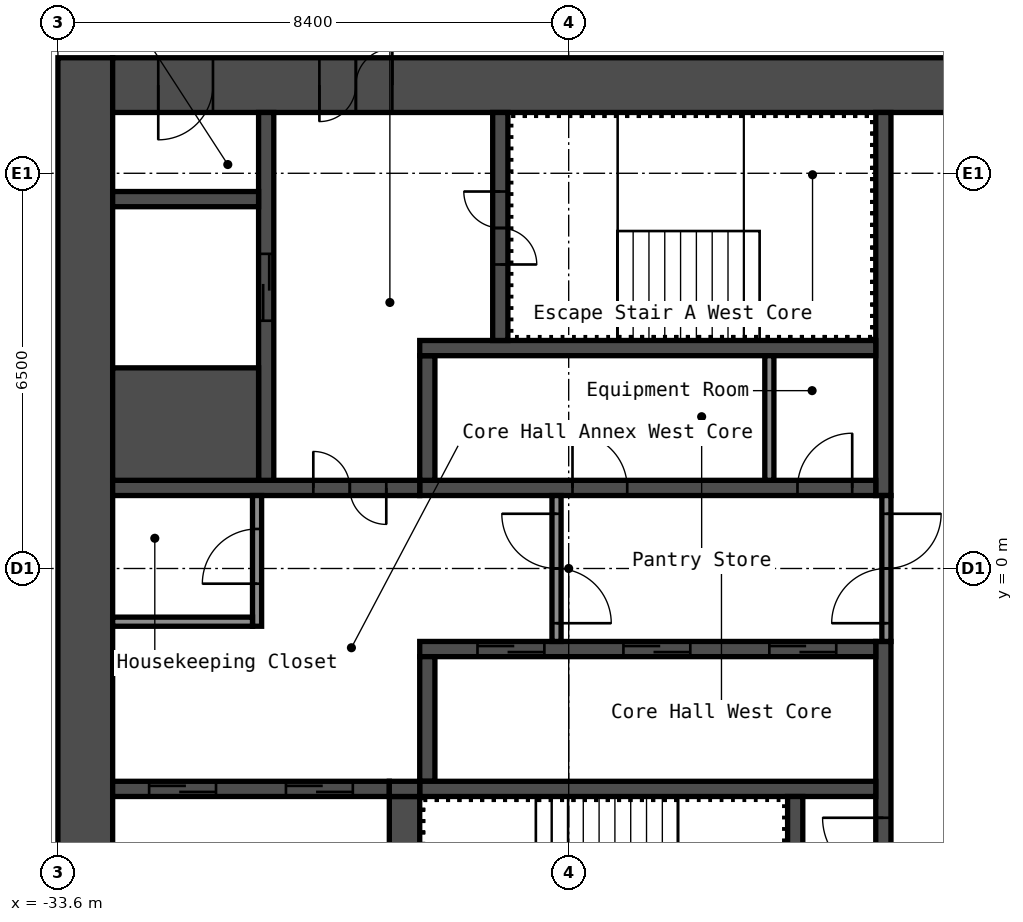
"""IFC4 building model, lengths in metres.
Left out: names, types, materials, properties, quantities, classifications, styles, units other than length and angle.
Written with IfcOpenShell. Run it as: python <this file> out.ifc"""

import sys

from ifc_helpers import new_model, si_unit, direction, frame, frame_2d, origin, place, context, subcontext, project, spatial, rectangle, extrude, element, fill, save


model = new_model("IFC4")
c1 = context("Model", 3, precision=1e-05, world=origin(), true_north=direction((0.0, 1.0)))
c2 = subcontext(c1, "Body", "Model", "MODEL_VIEW")
j1 = project(units=[si_unit("LENGTHUNIT", "METRE"), si_unit("PLANEANGLEUNIT", "RADIAN")], contexts=[c1])
p1 = place(None, origin())
s1 = spatial("IfcSite", under=j1, at=p1, CompositionType="ELEMENT")
p2 = place(p1, origin())
s2 = spatial("IfcBuilding", under=s1, at=p2, CompositionType="ELEMENT")
p3 = place(p2, frame((0.0, 0.0, 180.2)))
s3 = spatial("IfcBuildingStorey", under=s2, at=p3, CompositionType="ELEMENT", Elevation=180.2)
p4 = place(p3, frame((-33.15, -8.4, 0.0), z_axis=(0.0, 0.0, 1.0), x_axis=(0.0, 1.0, 0.0)))
e1 = element("IfcWall", 1, at=p4, inside=s3, PredefinedType="SHEAR", context=c2, shape_type="SweptSolid", body=[
    extrude(rectangle(XDim=16.8, YDim=0.9, at=frame_2d((8.4, 0.0))), origin(), (0.0, 0.0, 1.0), 5.95),
])
p5 = place(p3, frame((-32.7, 7.95, 0.0), z_axis=(0.0, 0.0, 1.0), x_axis=(1.0, 0.0, 0.0)))
e2 = element("IfcWall", 2, at=p5, inside=s3, PredefinedType="SHEAR", context=c2, shape_type="SweptSolid", body=[
    extrude(rectangle(XDim=15.0, YDim=0.9, at=frame_2d((7.5, 0.0))), origin(), (0.0, 0.0, 1.0), 5.95),
])
p6 = place(p5, frame((3.4, 0.0, 0.0)))
e3 = element("IfcOpeningElement", 3, at=p6, cuts=e2, PredefinedType="OPENING", context=c2, shape_type="SweptSolid", body=[
    extrude(rectangle(XDim=1.2, YDim=2.1, at=frame_2d((0.6, 1.05))), frame((0.0, 0.46, 0.0), z_axis=(0.0, -1.0, 0.0), x_axis=(1.0, 0.0, 0.0)), (0.0, 0.0, 1.0), 0.92),
])
p7 = place(p5, frame((0.75, 0.0, 0.0)))
e4 = element("IfcOpeningElement", 4, at=p7, cuts=e2, PredefinedType="OPENING", context=c2, shape_type="SweptSolid", body=[
    extrude(rectangle(XDim=0.9, YDim=2.1, at=frame_2d((0.45, 1.05))), frame((0.0, 0.46, 0.0), z_axis=(0.0, -1.0, 0.0), x_axis=(1.0, 0.0, 0.0)), (0.0, 0.0, 1.0), 0.92),
])
p8 = place(p3, frame((-20.025, 1.2, 0.0), z_axis=(0.0, 0.0, 1.0), x_axis=(0.0, 1.0, 0.0)))
e5 = element("IfcWall", 5, at=p8, inside=s3, PredefinedType="SHEAR", context=c2, shape_type="SweptSolid", body=[
    extrude(rectangle(XDim=6.3, YDim=0.25, at=frame_2d((3.15, 0.0))), origin(), (0.0, 0.0, 1.0), 5.95),
])
p9 = place(p3, frame((-20.025, -7.5, 0.0), z_axis=(0.0, 0.0, 1.0), x_axis=(0.0, 1.0, 0.0)))
e6 = element("IfcWall", 6, at=p9, inside=s3, PredefinedType="SHEAR", context=c2, shape_type="SweptSolid", body=[
    extrude(rectangle(XDim=6.3, YDim=0.25, at=frame_2d((3.15, 0.0))), origin(), (0.0, 0.0, 1.0), 5.95),
])
p10 = place(p9, frame((2.4, 0.0, 0.0)))
e7 = element("IfcOpeningElement", 7, at=p10, cuts=e6, PredefinedType="OPENING", context=c2, shape_type="SweptSolid", body=[
    extrude(rectangle(XDim=1.0, YDim=2.1, at=frame_2d((0.5, 1.05))), frame((0.0, 0.135, 0.0), z_axis=(0.0, -1.0, 0.0), x_axis=(1.0, 0.0, 0.0)), (0.0, 0.0, 1.0), 0.27),
])
p11 = place(p3, frame((-27.65, 1.325, 0.0), z_axis=(0.0, 0.0, 1.0), x_axis=(1.0, 0.0, 0.0)))
e8 = element("IfcWall", 8, at=p11, inside=s3, PredefinedType="SHEAR", context=c2, shape_type="SweptSolid", body=[
    extrude(rectangle(XDim=7.5, YDim=0.25, at=frame_2d((3.75, 0.0))), origin(), (0.0, 0.0, 1.0), 5.95),
])
p12 = place(p11, frame((6.212, 0.0, 0.0)))
e9 = element("IfcOpeningElement", 9, at=p12, cuts=e8, PredefinedType="OPENING", context=c2, shape_type="SweptSolid", body=[
    extrude(rectangle(XDim=0.9, YDim=2.1, at=frame_2d((0.45, 1.05))), frame((0.0, 0.135, 0.0), z_axis=(0.0, -1.0, 0.0), x_axis=(1.0, 0.0, 0.0)), (0.0, 0.0, 1.0), 0.27),
])
p13 = place(p11, frame((2.512, 0.0, 0.0)))
e10 = element("IfcOpeningElement", 10, at=p13, cuts=e8, PredefinedType="OPENING", context=c2, shape_type="SweptSolid", body=[
    extrude(rectangle(XDim=0.9, YDim=2.1, at=frame_2d((0.45, 1.05))), frame((0.0, 0.135, 0.0), z_axis=(0.0, -1.0, 0.0), x_axis=(1.0, 0.0, 0.0)), (0.0, 0.0, 1.0), 0.27),
])
p14 = place(p3, frame((-27.525, 1.45, 0.0), z_axis=(0.0, 0.0, 1.0), x_axis=(0.0, 1.0, 0.0)))
e11 = element("IfcWall", 11, at=p14, inside=s3, PredefinedType="SHEAR", context=c2, shape_type="SweptSolid", body=[
    extrude(rectangle(XDim=2.05, YDim=0.25, at=frame_2d((1.025, 0.0))), origin(), (0.0, 0.0, 1.0), 5.95),
])
p15 = place(p3, frame((-27.65, 3.625, 0.0), z_axis=(0.0, 0.0, 1.0), x_axis=(1.0, 0.0, 0.0)))
e12 = element("IfcWall", 12, at=p15, inside=s3, PredefinedType="SHEAR", context=c2, shape_type="SweptSolid", body=[
    extrude(rectangle(XDim=7.5, YDim=0.25, at=frame_2d((3.75, 0.0))), origin(), (0.0, 0.0, 1.0), 5.95),
])
p16 = place(p3, frame((-26.325, 3.75, 0.0), z_axis=(0.0, 0.0, 1.0), x_axis=(0.0, 1.0, 0.0)))
e13 = element("IfcWall", 13, at=p16, inside=s3, PredefinedType="SHEAR", context=c2, shape_type="SweptSolid", body=[
    extrude(rectangle(XDim=3.75, YDim=0.25, at=frame_2d((1.875, 0.0))), origin(), (0.0, 0.0, 1.0), 5.95),
])
p17 = place(p16, frame((1.25, 0.0, 0.0)))
e14 = element("IfcOpeningElement", 14, at=p17, cuts=e13, PredefinedType="OPENING", context=c2, shape_type="SweptSolid", body=[
    extrude(rectangle(XDim=1.2, YDim=2.1, at=frame_2d((0.6, 1.05))), frame((0.0, 0.135, 0.0), z_axis=(0.0, -1.0, 0.0), x_axis=(1.0, 0.0, 0.0)), (0.0, 0.0, 1.0), 0.27),
])
p18 = place(p3, frame((-32.7, 1.325, 0.0), z_axis=(0.0, 0.0, 1.0), x_axis=(1.0, 0.0, 0.0)))
e15 = element("IfcWall", 15, at=p18, inside=s3, PredefinedType="SHEAR", context=c2, shape_type="SweptSolid", body=[
    extrude(rectangle(XDim=5.05, YDim=0.25, at=frame_2d((2.525, 0.0))), origin(), (0.0, 0.0, 1.0), 5.95),
])
p19 = place(p18, frame((3.3, 0.0, 0.0)))
e16 = element("IfcOpeningElement", 16, at=p19, cuts=e15, PredefinedType="OPENING", context=c2, shape_type="SweptSolid", body=[
    extrude(rectangle(XDim=1.2, YDim=2.1, at=frame_2d((0.6, 1.05))), frame((0.0, 0.135, 0.0), z_axis=(0.0, -1.0, 0.0), x_axis=(1.0, 0.0, 0.0)), (0.0, 0.0, 1.0), 0.27),
])
p20 = place(p3, frame((-30.175, 1.45, 0.0), z_axis=(0.0, 0.0, 1.0), x_axis=(0.0, 1.0, 0.0)))
e17 = element("IfcWall", 17, at=p20, inside=s3, PredefinedType="SHEAR", context=c2, shape_type="SweptSolid", body=[
    extrude(rectangle(XDim=6.05, YDim=0.25, at=frame_2d((3.025, 0.0))), origin(), (0.0, 0.0, 1.0), 5.95),
])
p21 = place(p20, frame((2.625, 0.0, 0.0)))
e18 = element("IfcOpeningElement", 18, at=p21, cuts=e17, PredefinedType="OPENING", context=c2, shape_type="SweptSolid", body=[
    extrude(rectangle(XDim=1.1, YDim=2.1, at=frame_2d((0.55, 1.05))), frame((0.0, 0.135, 0.0), z_axis=(0.0, -1.0, 0.0), x_axis=(1.0, 0.0, 0.0)), (0.0, 0.0, 1.0), 0.27),
])
p22 = place(p3, frame((-32.7, 2.375, 0.0), z_axis=(0.0, 0.0, 1.0), x_axis=(1.0, 0.0, 0.0)))
e19 = element("IfcWall", 19, at=p22, inside=s3, PredefinedType="SHEAR", context=c2, shape_type="SweptSolid", body=[
    extrude(rectangle(XDim=2.4, YDim=1.85, at=frame_2d((1.2, 0.0))), origin(), (0.0, 0.0, 1.0), 5.95),
])
p23 = place(p3, frame((-32.7, 6.075, 0.0), z_axis=(0.0, 0.0, 1.0), x_axis=(1.0, 0.0, 0.0)))
e20 = element("IfcWall", 20, at=p23, inside=s3, PredefinedType="SHEAR", context=c2, shape_type="SweptSolid", body=[
    extrude(rectangle(XDim=2.4, YDim=0.25, at=frame_2d((1.2, 0.0))), origin(), (0.0, 0.0, 1.0), 5.95),
])
p24 = place(p3, frame((-27.65, -1.325, 0.0), z_axis=(0.0, 0.0, 1.0), x_axis=(1.0, 0.0, 0.0)))
e21 = element("IfcWall", 21, at=p24, inside=s3, PredefinedType="SHEAR", context=c2, shape_type="SweptSolid", body=[
    extrude(rectangle(XDim=7.5, YDim=0.25, at=frame_2d((3.75, 0.0))), origin(), (0.0, 0.0, 1.0), 5.95),
])
p25 = place(p24, frame((5.75, 0.0, 0.0)))
e22 = element("IfcOpeningElement", 22, at=p25, cuts=e21, PredefinedType="OPENING", context=c2, shape_type="SweptSolid", body=[
    extrude(rectangle(XDim=1.1, YDim=2.1, at=frame_2d((0.55, 1.05))), frame((0.0, 0.135, 0.0), z_axis=(0.0, -1.0, 0.0), x_axis=(1.0, 0.0, 0.0)), (0.0, 0.0, 1.0), 0.27),
])
p26 = place(p24, frame((3.35, 0.0, 0.0)))
e23 = element("IfcOpeningElement", 23, at=p26, cuts=e21, PredefinedType="OPENING", context=c2, shape_type="SweptSolid", body=[
    extrude(rectangle(XDim=1.1, YDim=2.1, at=frame_2d((0.55, 1.05))), frame((0.0, 0.135, 0.0), z_axis=(0.0, -1.0, 0.0), x_axis=(1.0, 0.0, 0.0)), (0.0, 0.0, 1.0), 0.27),
])
p27 = place(p24, frame((0.95, 0.0, 0.0)))
e24 = element("IfcOpeningElement", 24, at=p27, cuts=e21, PredefinedType="OPENING", context=c2, shape_type="SweptSolid", body=[
    extrude(rectangle(XDim=1.1, YDim=2.1, at=frame_2d((0.55, 1.05))), frame((0.0, 0.135, 0.0), z_axis=(0.0, -1.0, 0.0), x_axis=(1.0, 0.0, 0.0)), (0.0, 0.0, 1.0), 0.27),
])
p28 = place(p3, frame((-27.525, -3.5, 0.0), z_axis=(0.0, 0.0, 1.0), x_axis=(0.0, 1.0, 0.0)))
e25 = element("IfcWall", 25, at=p28, inside=s3, PredefinedType="SHEAR", context=c2, shape_type="SweptSolid", body=[
    extrude(rectangle(XDim=2.05, YDim=0.25, at=frame_2d((1.025, 0.0))), origin(), (0.0, 0.0, 1.0), 5.95),
])
p29 = place(p3, frame((-27.65, -3.625, 0.0), z_axis=(0.0, 0.0, 1.0), x_axis=(1.0, 0.0, 0.0)))
e26 = element("IfcWall", 26, at=p29, inside=s3, PredefinedType="SHEAR", context=c2, shape_type="SweptSolid", body=[
    extrude(rectangle(XDim=7.5, YDim=0.25, at=frame_2d((3.75, 0.0))), origin(), (0.0, 0.0, 1.0), 5.95),
])
p30 = place(p3, frame((-21.475, -7.5, 0.0), z_axis=(0.0, 0.0, 1.0), x_axis=(0.0, 1.0, 0.0)))
e27 = element("IfcWall", 27, at=p30, inside=s3, PredefinedType="SHEAR", context=c2, shape_type="SweptSolid", body=[
    extrude(rectangle(XDim=3.75, YDim=0.25, at=frame_2d((1.875, 0.0))), origin(), (0.0, 0.0, 1.0), 5.95),
])
p31 = place(p30, frame((1.3, 0.0, 0.0)))
e28 = element("IfcOpeningElement", 28, at=p31, cuts=e27, PredefinedType="OPENING", context=c2, shape_type="SweptSolid", body=[
    extrude(rectangle(XDim=1.2, YDim=2.1, at=frame_2d((0.6, 1.05))), frame((0.0, 0.135, 0.0), z_axis=(0.0, -1.0, 0.0), x_axis=(1.0, 0.0, 0.0)), (0.0, 0.0, 1.0), 0.27),
])
p32 = place(p3, frame((-27.9, -7.5, 0.0), z_axis=(0.0, 0.0, 1.0), x_axis=(0.0, 1.0, 0.0)))
e29 = element("IfcWall", 29, at=p32, inside=s3, PredefinedType="SHEAR", context=c2, shape_type="SweptSolid", body=[
    extrude(rectangle(XDim=3.75, YDim=0.5, at=frame_2d((1.875, 0.0))), origin(), (0.0, 0.0, 1.0), 5.95),
])
p33 = place(p3, frame((-32.7, -3.625, 0.0), z_axis=(0.0, 0.0, 1.0), x_axis=(1.0, 0.0, 0.0)))
e30 = element("IfcWall", 30, at=p33, inside=s3, PredefinedType="SHEAR", context=c2, shape_type="SweptSolid", body=[
    extrude(rectangle(XDim=4.55, YDim=0.25, at=frame_2d((2.275, 0.0))), origin(), (0.0, 0.0, 1.0), 5.95),
])
p34 = place(p33, frame((2.85, 0.0, 0.0)))
e31 = element("IfcOpeningElement", 31, at=p34, cuts=e30, PredefinedType="OPENING", context=c2, shape_type="SweptSolid", body=[
    extrude(rectangle(XDim=1.1, YDim=2.1, at=frame_2d((0.55, 1.05))), frame((0.0, 0.135, 0.0), z_axis=(0.0, -1.0, 0.0), x_axis=(1.0, 0.0, 0.0)), (0.0, 0.0, 1.0), 0.27),
])
p35 = place(p33, frame((0.6, 0.0, 0.0)))
e32 = element("IfcOpeningElement", 32, at=p35, cuts=e30, PredefinedType="OPENING", context=c2, shape_type="SweptSolid", body=[
    extrude(rectangle(XDim=1.1, YDim=2.1, at=frame_2d((0.55, 1.05))), frame((0.0, 0.135, 0.0), z_axis=(0.0, -1.0, 0.0), x_axis=(1.0, 0.0, 0.0)), (0.0, 0.0, 1.0), 0.27),
])
p36 = place(p3, frame((-28.15, -3.625, 0.0), z_axis=(0.0, 0.0, 1.0), x_axis=(1.0, 0.0, 0.0)))
e33 = element("IfcWall", 33, at=p36, inside=s3, PredefinedType="SHEAR", context=c2, shape_type="SweptSolid", body=[
    extrude(rectangle(XDim=0.5, YDim=0.25, at=frame_2d((0.25, 0.0))), origin(), (0.0, 0.0, 1.0), 5.95),
])
p37 = place(p3, frame((-19.975, -1.2, 0.0), z_axis=(0.0, 0.0, 1.0), x_axis=(0.0, 1.0, 0.0)))
e34 = element("IfcWall", 34, at=p37, inside=s3, PredefinedType="PARTITIONING", context=c2, shape_type="SweptSolid", body=[
    extrude(rectangle(XDim=2.4, YDim=0.15, at=frame_2d((1.2, 0.0))), origin(), (0.0, 0.0, 1.0), 5.95),
])
p38 = place(p37, frame((0.3, 0.0, 0.0)))
e35 = element("IfcOpeningElement", 35, at=p38, cuts=e34, PredefinedType="OPENING", context=c2, shape_type="SweptSolid", body=[
    extrude(rectangle(XDim=1.8, YDim=2.1, at=frame_2d((0.9, 1.05))), frame((0.0, 0.085, 0.0), z_axis=(0.0, -1.0, 0.0), x_axis=(1.0, 0.0, 0.0)), (0.0, 0.0, 1.0), 0.17),
])
p39 = place(p3, frame((-25.4, -1.2, 0.0), z_axis=(0.0, 0.0, 1.0), x_axis=(0.0, 1.0, 0.0)))
e36 = element("IfcWall", 36, at=p39, inside=s3, PredefinedType="PARTITIONING", context=c2, shape_type="SweptSolid", body=[
    extrude(rectangle(XDim=2.4, YDim=0.15, at=frame_2d((1.2, 0.0))), origin(), (0.0, 0.0, 1.0), 5.95),
])
p40 = place(p39, frame((0.3, 0.0, 0.0)))
e37 = element("IfcOpeningElement", 37, at=p40, cuts=e36, PredefinedType="OPENING", context=c2, shape_type="SweptSolid", body=[
    extrude(rectangle(XDim=1.8, YDim=2.1, at=frame_2d((0.9, 1.05))), frame((0.0, 0.085, 0.0), z_axis=(0.0, -1.0, 0.0), x_axis=(1.0, 0.0, 0.0)), (0.0, 0.0, 1.0), 0.17),
])
p41 = place(p3, frame((-30.325, -0.95, 0.0), z_axis=(0.0, 0.0, 1.0), x_axis=(0.0, 1.0, 0.0)))
e38 = element("IfcWall", 38, at=p41, inside=s3, PredefinedType="PARTITIONING", context=c2, shape_type="SweptSolid", body=[
    extrude(rectangle(XDim=2.15, YDim=0.15, at=frame_2d((1.075, 0.0))), origin(), (0.0, 0.0, 1.0), 5.95),
])
p42 = place(p41, frame((0.7, 0.0, 0.0)))
e39 = element("IfcOpeningElement", 39, at=p42, cuts=e38, PredefinedType="OPENING", context=c2, shape_type="SweptSolid", body=[
    extrude(rectangle(XDim=0.9, YDim=2.1, at=frame_2d((0.45, 1.05))), frame((0.0, 0.085, 0.0), z_axis=(0.0, -1.0, 0.0), x_axis=(1.0, 0.0, 0.0)), (0.0, 0.0, 1.0), 0.17),
])
p43 = place(p3, frame((-32.7, -0.875, 0.0), z_axis=(0.0, 0.0, 1.0), x_axis=(1.0, 0.0, 0.0)))
e40 = element("IfcWall", 40, at=p43, inside=s3, PredefinedType="PARTITIONING", context=c2, shape_type="SweptSolid", body=[
    extrude(rectangle(XDim=2.3, YDim=0.15, at=frame_2d((1.15, 0.0))), origin(), (0.0, 0.0, 1.0), 5.95),
])
p44 = place(p3, frame((-21.9, 1.45, 0.0), z_axis=(0.0, 0.0, 1.0), x_axis=(0.0, 1.0, 0.0)))
e41 = element("IfcWall", 41, at=p44, inside=s3, PredefinedType="PARTITIONING", context=c2, shape_type="SweptSolid", body=[
    extrude(rectangle(XDim=2.05, YDim=0.15, at=frame_2d((1.025, 0.0))), origin(), (0.0, 0.0, 1.0), 5.95),
])
p45 = place(p6, origin())
e42 = element("IfcDoor", 42, at=p45, inside=s3, OperationType="DOUBLE_DOOR_SINGLE_SWING", PredefinedType="DOOR", context=c2, shape_type="SweptSolid", body=[
    extrude(rectangle(XDim=1.2, YDim=2.1, at=frame_2d((0.6, 1.05))), frame((0.0, 0.025, 0.0), z_axis=(0.0, -1.0, 0.0), x_axis=(1.0, 0.0, 0.0)), (0.0, 0.0, 1.0), 0.05),
])
fill(e3, e42)
p46 = place(p7, origin())
e43 = element("IfcDoor", 43, at=p46, inside=s3, OperationType="SINGLE_SWING_LEFT", PredefinedType="DOOR", context=c2, shape_type="SweptSolid", body=[
    extrude(rectangle(XDim=0.9, YDim=2.1, at=frame_2d((0.45, 1.05))), frame((0.0, 0.025, 0.0), z_axis=(0.0, -1.0, 0.0), x_axis=(1.0, 0.0, 0.0)), (0.0, 0.0, 1.0), 0.05),
])
fill(e4, e43)
p47 = place(p17, origin())
e44 = element("IfcDoor", 44, at=p47, inside=s3, OperationType="DOUBLE_DOOR_SINGLE_SWING", PredefinedType="DOOR", context=c2, shape_type="SweptSolid", body=[
    extrude(rectangle(XDim=1.2, YDim=2.1, at=frame_2d((0.6, 1.05))), frame((0.0, 0.025, 0.0), z_axis=(0.0, -1.0, 0.0), x_axis=(1.0, 0.0, 0.0)), (0.0, 0.0, 1.0), 0.05),
])
fill(e14, e44)
p48 = place(p10, origin())
e45 = element("IfcDoor", 45, at=p48, inside=s3, OperationType="SINGLE_SWING_LEFT", PredefinedType="DOOR", context=c2, shape_type="SweptSolid", body=[
    extrude(rectangle(XDim=1.0, YDim=2.1, at=frame_2d((0.5, 1.05))), frame((0.0, 0.025, 0.0), z_axis=(0.0, -1.0, 0.0), x_axis=(1.0, 0.0, 0.0)), (0.0, 0.0, 1.0), 0.05),
])
fill(e7, e45)
p49 = place(p19, origin())
e46 = element("IfcDoor", 46, at=p49, inside=s3, OperationType="DOUBLE_DOOR_SINGLE_SWING", PredefinedType="DOOR", context=c2, shape_type="SweptSolid", body=[
    extrude(rectangle(XDim=1.2, YDim=2.1, at=frame_2d((0.6, 1.05))), frame((0.0, 0.025, 0.0), z_axis=(0.0, -1.0, 0.0), x_axis=(1.0, 0.0, 0.0)), (0.0, 0.0, 1.0), 0.05),
])
fill(e16, e46)
p50 = place(p38, origin())
e47 = element("IfcDoor", 47, at=p50, inside=s3, OperationType="DOUBLE_DOOR_SINGLE_SWING", PredefinedType="DOOR", context=c2, shape_type="SweptSolid", body=[
    extrude(rectangle(XDim=1.8, YDim=2.1, at=frame_2d((0.9, 1.05))), frame((0.0, 0.025, 0.0), z_axis=(0.0, -1.0, 0.0), x_axis=(1.0, 0.0, 0.0)), (0.0, 0.0, 1.0), 0.05),
])
fill(e35, e47)
p51 = place(p40, origin())
e48 = element("IfcDoor", 48, at=p51, inside=s3, OperationType="DOUBLE_DOOR_SINGLE_SWING", PredefinedType="DOOR", context=c2, shape_type="SweptSolid", body=[
    extrude(rectangle(XDim=1.8, YDim=2.1, at=frame_2d((0.9, 1.05))), frame((0.0, 0.025, 0.0), z_axis=(0.0, -1.0, 0.0), x_axis=(1.0, 0.0, 0.0)), (0.0, 0.0, 1.0), 0.05),
])
fill(e37, e48)
p52 = place(p42, origin())
e49 = element("IfcDoor", 49, at=p52, inside=s3, OperationType="SINGLE_SWING_RIGHT", PredefinedType="DOOR", context=c2, shape_type="SweptSolid", body=[
    extrude(rectangle(XDim=0.9, YDim=2.1, at=frame_2d((0.45, 1.05))), frame((0.0, 0.025, 0.0), z_axis=(0.0, -1.0, 0.0), x_axis=(1.0, 0.0, 0.0)), (0.0, 0.0, 1.0), 0.05),
])
fill(e39, e49)
p53 = place(p12, origin())
e50 = element("IfcDoor", 50, at=p53, inside=s3, OperationType="SINGLE_SWING_LEFT", PredefinedType="DOOR", context=c2, shape_type="SweptSolid", body=[
    extrude(rectangle(XDim=0.9, YDim=2.1, at=frame_2d((0.45, 1.05))), frame((0.0, 0.025, 0.0), z_axis=(0.0, -1.0, 0.0), x_axis=(1.0, 0.0, 0.0)), (0.0, 0.0, 1.0), 0.05),
])
fill(e9, e50)
p54 = place(p13, origin())
e51 = element("IfcDoor", 51, at=p54, inside=s3, OperationType="SINGLE_SWING_RIGHT", PredefinedType="DOOR", context=c2, shape_type="SweptSolid", body=[
    extrude(rectangle(XDim=0.9, YDim=2.1, at=frame_2d((0.45, 1.05))), frame((0.0, 0.025, 0.0), z_axis=(0.0, -1.0, 0.0), x_axis=(1.0, 0.0, 0.0)), (0.0, 0.0, 1.0), 0.05),
])
fill(e10, e51)
p55 = place(p25, origin())
e52 = element("IfcDoor", 52, at=p55, inside=s3, OperationType="DOUBLE_DOOR_SLIDING", PredefinedType="DOOR", context=c2, shape_type="SweptSolid", body=[
    extrude(rectangle(XDim=1.1, YDim=2.1, at=frame_2d((0.55, 1.05))), frame((0.0, 0.025, 0.0), z_axis=(0.0, -1.0, 0.0), x_axis=(1.0, 0.0, 0.0)), (0.0, 0.0, 1.0), 0.05),
])
fill(e22, e52)
p56 = place(p26, origin())
e53 = element("IfcDoor", 53, at=p56, inside=s3, OperationType="DOUBLE_DOOR_SLIDING", PredefinedType="DOOR", context=c2, shape_type="SweptSolid", body=[
    extrude(rectangle(XDim=1.1, YDim=2.1, at=frame_2d((0.55, 1.05))), frame((0.0, 0.025, 0.0), z_axis=(0.0, -1.0, 0.0), x_axis=(1.0, 0.0, 0.0)), (0.0, 0.0, 1.0), 0.05),
])
fill(e23, e53)
p57 = place(p27, origin())
e54 = element("IfcDoor", 54, at=p57, inside=s3, OperationType="DOUBLE_DOOR_SLIDING", PredefinedType="DOOR", context=c2, shape_type="SweptSolid", body=[
    extrude(rectangle(XDim=1.1, YDim=2.1, at=frame_2d((0.55, 1.05))), frame((0.0, 0.025, 0.0), z_axis=(0.0, -1.0, 0.0), x_axis=(1.0, 0.0, 0.0)), (0.0, 0.0, 1.0), 0.05),
])
fill(e24, e54)
p58 = place(p21, origin())
e55 = element("IfcDoor", 55, at=p58, inside=s3, OperationType="DOUBLE_DOOR_SLIDING", PredefinedType="DOOR", context=c2, shape_type="SweptSolid", body=[
    extrude(rectangle(XDim=1.1, YDim=2.1, at=frame_2d((0.55, 1.05))), frame((0.0, 0.025, 0.0), z_axis=(0.0, -1.0, 0.0), x_axis=(1.0, 0.0, 0.0)), (0.0, 0.0, 1.0), 0.05),
])
fill(e18, e55)
p59 = place(p34, origin())
e56 = element("IfcDoor", 56, at=p59, inside=s3, OperationType="DOUBLE_DOOR_SLIDING", PredefinedType="DOOR", context=c2, shape_type="SweptSolid", body=[
    extrude(rectangle(XDim=1.1, YDim=2.1, at=frame_2d((0.55, 1.05))), frame((0.0, 0.025, 0.0), z_axis=(0.0, -1.0, 0.0), x_axis=(1.0, 0.0, 0.0)), (0.0, 0.0, 1.0), 0.05),
])
fill(e31, e56)
p60 = place(p35, origin())
e57 = element("IfcDoor", 57, at=p60, inside=s3, OperationType="DOUBLE_DOOR_SLIDING", PredefinedType="DOOR", context=c2, shape_type="SweptSolid", body=[
    extrude(rectangle(XDim=1.1, YDim=2.1, at=frame_2d((0.55, 1.05))), frame((0.0, 0.025, 0.0), z_axis=(0.0, -1.0, 0.0), x_axis=(1.0, 0.0, 0.0)), (0.0, 0.0, 1.0), 0.05),
])
fill(e32, e57)
save(model, sys.argv[1])
